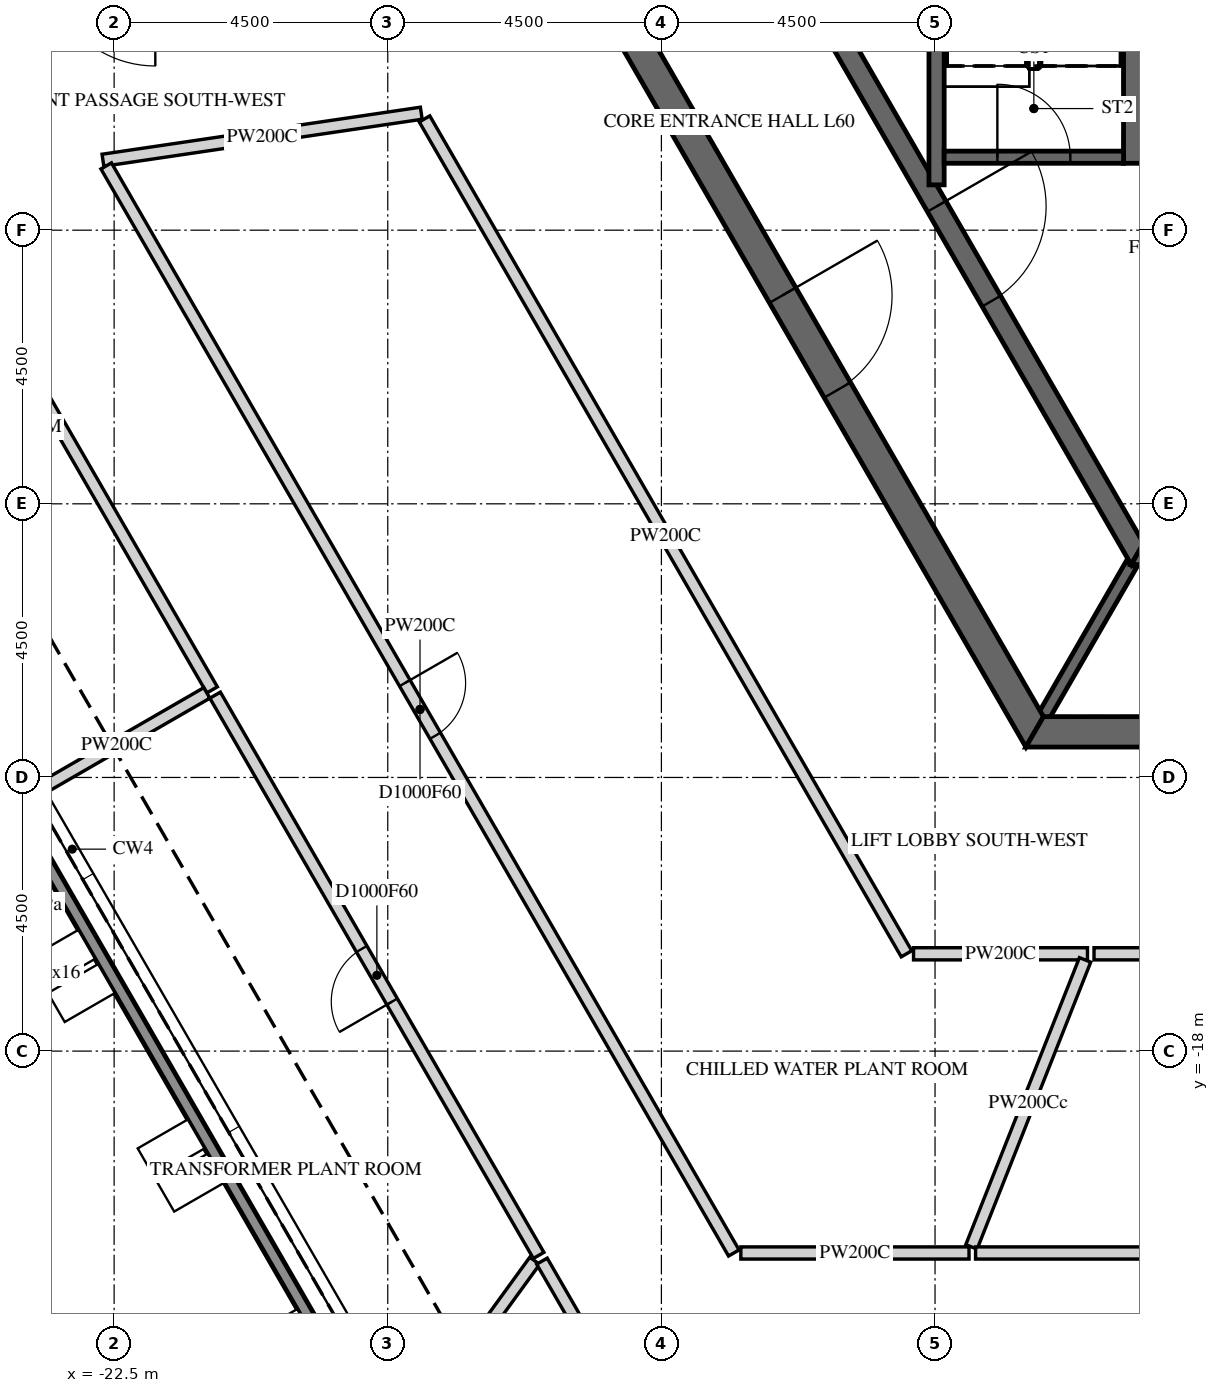
"""IFC4 building model, lengths in metres.
Left out: names, types, materials, properties, quantities, classifications, styles, units other than length and angle.
Written with IfcOpenShell. Run it as: python <this file> out.ifc"""

import sys

from ifc_helpers import new_model, si_unit, direction, frame, frame_2d, origin, place, context, subcontext, project, spatial, polyline, rectangle, outline, extrude, element, fill, save


model = new_model("IFC4")
c1 = context("Model", 3, precision=1e-05, world=origin(), true_north=direction((0.0, 1.0)))
c2 = subcontext(c1, "Body", "Model", "MODEL_VIEW")
j1 = project(units=[si_unit("LENGTHUNIT", "METRE"), si_unit("PLANEANGLEUNIT", "RADIAN")], contexts=[c1])
p1 = place(None, origin())
s1 = spatial("IfcSite", under=j1, at=p1, CompositionType="ELEMENT")
p2 = place(p1, origin())
s2 = spatial("IfcBuilding", under=s1, at=p2, CompositionType="ELEMENT")
p3 = place(p2, frame((0.0, 0.0, 250.2)))
s3 = spatial("IfcBuildingStorey", under=s2, at=p3, CompositionType="ELEMENT", Elevation=250.2)
p4 = place(p3, frame((-16.668, -26.93, 5.7), z_axis=(0.0, 0.0, 1.0), x_axis=(-0.499997219864, 0.866027008891, 0.0)))
e1 = element("IfcWall", 1, at=p4, inside=s3, PredefinedType="PARAPET", context=c2, shape_type="SweptSolid", body=[
    extrude(outline(polyline([(0.009, -0.1), (27.732, -0.1), (27.749, 0.1), (-0.009, 0.1), (0.009, -0.1)])), origin(), (0.0, 0.0, 1.0), 1.1),
])
p5 = place(p3, frame((-14.722, 0.0, -0.3), z_axis=(0.0, 0.0, 1.0), x_axis=(0.50000571537, -0.866022103989, 0.0)))
e2 = element("IfcWall", 2, at=p5, inside=s3, PredefinedType="SHEAR", context=c2, shape_type="SweptSolid", body=[
    extrude(outline(polyline([(-0.144, -0.25), (14.867, -0.25), (14.578, 0.25), (0.144, 0.25), (-0.144, -0.25)])), origin(), (0.0, 0.0, 1.0), 5.8),
])
p6 = place(p5, frame((6.432, 0.0, 0.3)))
e3 = element("IfcOpeningElement", 3, at=p6, cuts=e2, PredefinedType="OPENING", context=c2, shape_type="SweptSolid", body=[
    extrude(rectangle(XDim=1.8, YDim=2.4, at=frame_2d((0.9, 1.2))), frame((0.0, 0.26, 0.0), z_axis=(0.0, -1.0, 0.0), x_axis=(1.0, 0.0, 0.0)), (0.0, 0.0, 1.0), 0.52),
])
p7 = place(p3, frame((-7.361, -12.75, -0.3), z_axis=(0.0, 0.0, 1.0), x_axis=(1.0, 0.0, 0.0)))
e4 = element("IfcWall", 4, at=p7, inside=s3, PredefinedType="SHEAR", context=c2, shape_type="SweptSolid", body=[
    extrude(outline(polyline([(-0.144, -0.25), (14.866, -0.25), (14.578, 0.25), (0.144, 0.25), (-0.144, -0.25)])), origin(), (0.0, 0.0, 1.0), 5.8),
])
p8 = place(p7, frame((6.761, 0.0, 0.3)))
e5 = element("IfcOpeningElement", 5, at=p8, cuts=e4, PredefinedType="OPENING", context=c2, shape_type="SweptSolid", body=[
    extrude(rectangle(XDim=1.2, YDim=2.4, at=frame_2d((0.6, 1.2))), frame((0.0, 0.26, 0.0), z_axis=(0.0, -1.0, 0.0), x_axis=(1.0, 0.0, 0.0)), (0.0, 0.0, 1.0), 0.52),
])
p9 = place(p3, frame((-11.345, 0.0, -0.3), z_axis=(0.0, 0.0, 1.0), x_axis=(0.499995046907, -0.866028263435, 0.0)))
e6 = element("IfcWall", 6, at=p9, inside=s3, PredefinedType="SHEAR", context=c2, shape_type="SweptSolid", body=[
    extrude(outline(polyline([(-0.101, -0.175), (11.446, -0.175), (11.244, 0.175), (0.101, 0.175), (-0.101, -0.175)])), origin(), (0.0, 0.0, 1.0), 5.8),
])
p10 = place(p9, frame((4.744, 0.0, 0.3)))
e7 = element("IfcOpeningElement", 7, at=p10, cuts=e6, PredefinedType="OPENING", context=c2, shape_type="SweptSolid", body=[
    extrude(rectangle(XDim=1.8, YDim=2.4, at=frame_2d((0.9, 1.2))), frame((0.0, 0.185, 0.0), z_axis=(0.0, -1.0, 0.0), x_axis=(1.0, 0.0, 0.0)), (0.0, 0.0, 1.0), 0.37),
])
p11 = place(p3, frame((-5.673, -9.825, -0.3), z_axis=(0.0, 0.0, 1.0), x_axis=(1.0, 0.0, 0.0)))
e8 = element("IfcWall", 8, at=p11, inside=s3, PredefinedType="SHEAR", context=c2, shape_type="SweptSolid", body=[
    extrude(outline(polyline([(-0.101, -0.175), (11.446, -0.175), (11.244, 0.175), (0.101, 0.175), (-0.101, -0.175)])), origin(), (0.0, 0.0, 1.0), 5.8),
])
p12 = place(p3, frame((-5.773, -10.0, -0.3), z_axis=(0.0, 0.0, 1.0), x_axis=(-0.499995765644, -0.866027848477, 0.0)))
e9 = element("IfcWall", 9, at=p12, inside=s3, PredefinedType="SHEAR", context=c2, shape_type="SweptSolid", body=[
    extrude(rectangle(XDim=2.887, YDim=0.2, at=frame_2d((1.443, 0.0))), origin(), (0.0, 0.0, 1.0), 5.8),
])
p13 = place(p3, frame((-5.75, -3.4, -0.25), z_axis=(0.0, 0.0, 1.0), x_axis=(0.0, 1.0, 0.0)))
e10 = element("IfcWall", 10, at=p13, inside=s3, PredefinedType="SHEAR", context=c2, shape_type="SweptSolid", body=[
    extrude(rectangle(XDim=6.8, YDim=0.3, at=frame_2d((3.4, 0.0))), origin(), (0.0, 0.0, 1.0), 5.75),
])
p14 = place(p3, frame((-8.975, -3.755, -0.25), z_axis=(0.0, 0.0, 1.0), x_axis=(0.0, 1.0, 0.0)))
e11 = element("IfcWall", 11, at=p14, inside=s3, PredefinedType="SHEAR", context=c2, shape_type="SweptSolid", body=[
    extrude(rectangle(XDim=7.51, YDim=0.25, at=frame_2d((3.755, 0.0))), origin(), (0.0, 0.0, 1.0), 5.75),
])
p15 = place(p3, frame((-8.85, -3.3, -0.25), z_axis=(0.0, 0.0, 1.0), x_axis=(1.0, 0.0, 0.0)))
e12 = element("IfcWall", 12, at=p15, inside=s3, PredefinedType="SHEAR", context=c2, shape_type="SweptSolid", body=[
    extrude(rectangle(XDim=2.95, YDim=0.2, at=frame_2d((1.475, 0.0))), origin(), (0.0, 0.0, 1.0), 5.75),
])
p16 = place(p15, frame((0.875, 0.0, 0.25)))
e13 = element("IfcOpeningElement", 13, at=p16, cuts=e12, PredefinedType="OPENING", context=c2, shape_type="SweptSolid", body=[
    extrude(rectangle(XDim=1.2, YDim=2.4, at=frame_2d((0.6, 1.2))), frame((0.0, 0.11, 0.0), z_axis=(0.0, -1.0, 0.0), x_axis=(1.0, 0.0, 0.0)), (0.0, 0.0, 1.0), 0.22),
])
p17 = place(p3, frame((-20.889, -12.06, 0.0), z_axis=(0.0, 0.0, 1.0), x_axis=(-0.49997661062, 0.866038907228, 0.0)))
e14 = element("IfcWall", 14, at=p17, inside=s3, PredefinedType="PARTITIONING", context=c2, shape_type="SweptSolid", body=[
    extrude(rectangle(XDim=13.637, YDim=0.2, at=frame_2d((6.818, 0.0))), origin(), (0.0, 0.0, 1.0), 5.5),
])
p18 = place(p17, frame((6.318, 0.0, 0.0)))
e15 = element("IfcOpeningElement", 15, at=p18, cuts=e14, PredefinedType="OPENING", context=c2, shape_type="SweptSolid", body=[
    extrude(rectangle(XDim=1.0, YDim=2.1, at=frame_2d((0.5, 1.05))), frame((0.0, 0.11, 0.0), z_axis=(0.0, -1.0, 0.0), x_axis=(1.0, 0.0, 0.0)), (0.0, 0.0, 1.0), 0.22),
])
p19 = place(p3, frame((-23.945, -13.825, 0.0), z_axis=(0.0, 0.0, 1.0), x_axis=(0.865991142412, 0.500059337743, 0.0)))
e16 = element("IfcWall", 16, at=p19, inside=s3, PredefinedType="PARTITIONING", context=c2, shape_type="SweptSolid", body=[
    extrude(rectangle(XDim=3.429, YDim=0.2, at=frame_2d((1.715, 0.0))), origin(), (0.0, 0.0, 1.0), 5.5),
])
p20 = place(p3, frame((-22.684, -3.35, 0.0), z_axis=(0.0, 0.0, 1.0), x_axis=(0.989268510668, 0.146108910753, 0.0)))
e17 = element("IfcWall", 17, at=p20, inside=s3, PredefinedType="PARTITIONING", context=c2, shape_type="SweptSolid", body=[
    extrude(rectangle(XDim=5.292, YDim=0.2, at=frame_2d((2.646, 0.0))), origin(), (0.0, 0.0, 1.0), 5.5),
])
p21 = place(p3, frame((-15.519, -21.36, 0.0), z_axis=(0.0, 0.0, 1.0), x_axis=(-0.500040928938, 0.866001772162, 0.0)))
e18 = element("IfcWall", 18, at=p21, inside=s3, PredefinedType="PARTITIONING", context=c2, shape_type="SweptSolid", body=[
    extrude(rectangle(XDim=10.639, YDim=0.2, at=frame_2d((5.32, 0.0))), origin(), (0.0, 0.0, 1.0), 5.5),
])
p22 = place(p21, frame((4.82, 0.0, 0.0)))
e19 = element("IfcOpeningElement", 19, at=p22, cuts=e18, PredefinedType="OPENING", context=c2, shape_type="SweptSolid", body=[
    extrude(rectangle(XDim=1.0, YDim=2.1, at=frame_2d((0.5, 1.05))), frame((0.0, 0.11, 0.0), z_axis=(0.0, -1.0, 0.0), x_axis=(1.0, 0.0, 0.0)), (0.0, 0.0, 1.0), 0.22),
])
p23 = place(p3, frame((-17.78, -24.471, 0.0), z_axis=(0.0, 0.0, 1.0), x_axis=(0.587876353265, 0.808950797807, 0.0)))
e20 = element("IfcWall", 20, at=p23, inside=s3, PredefinedType="PARTITIONING", context=c2, shape_type="SweptSolid", body=[
    extrude(rectangle(XDim=3.736, YDim=0.2, at=frame_2d((1.868, 0.0))), origin(), (0.0, 0.0, 1.0), 5.5),
])
p24 = place(p3, frame((-17.395, -2.67, 0.0), z_axis=(0.0, 0.0, 1.0), x_axis=(0.499971736126, -0.866041721325, 0.0)))
e21 = element("IfcWall", 21, at=p24, inside=s3, PredefinedType="PARTITIONING", context=c2, shape_type="SweptSolid", body=[
    extrude(rectangle(XDim=15.854, YDim=0.2, at=frame_2d((7.927, 0.0))), origin(), (0.0, 0.0, 1.0), 5.5),
])
p25 = place(p3, frame((-15.464, -21.455, 0.0), z_axis=(0.0, 0.0, 1.0), x_axis=(0.49988498741, -0.866091796152, 0.0)))
e22 = element("IfcWall", 22, at=p25, inside=s3, PredefinedType="PARTITIONING", context=c2, shape_type="SweptSolid", body=[
    extrude(rectangle(XDim=3.077, YDim=0.2, at=frame_2d((1.539, 0.0))), origin(), (0.0, 0.0, 1.0), 5.5),
])
p26 = place(p3, frame((-22.63, -3.443, 0.0), z_axis=(0.0, 0.0, 1.0), x_axis=(0.49999205116, -0.866029993001, 0.0)))
e23 = element("IfcWall", 23, at=p26, inside=s3, PredefinedType="PARTITIONING", context=c2, shape_type="SweptSolid", body=[
    extrude(rectangle(XDim=20.642, YDim=0.2, at=frame_2d((10.321, 0.0))), origin(), (0.0, 0.0, 1.0), 5.5),
])
p27 = place(p26, frame((9.821, 0.0, 0.0)))
e24 = element("IfcOpeningElement", 24, at=p27, cuts=e23, PredefinedType="OPENING", context=c2, shape_type="SweptSolid", body=[
    extrude(rectangle(XDim=1.0, YDim=2.1, at=frame_2d((0.5, 1.05))), frame((0.0, 0.11, 0.0), z_axis=(0.0, -1.0, 0.0), x_axis=(1.0, 0.0, 0.0)), (0.0, 0.0, 1.0), 0.22),
])
p28 = place(p3, frame((-9.354, -16.4, 0.0), z_axis=(0.0, 0.0, 1.0), x_axis=(1.0, 0.0, 0.0)))
e25 = element("IfcWall", 25, at=p28, inside=s3, PredefinedType="PARTITIONING", context=c2, shape_type="SweptSolid", body=[
    extrude(rectangle(XDim=2.861, YDim=0.2, at=frame_2d((1.43, 0.0))), origin(), (0.0, 0.0, 1.0), 5.5),
])
p29 = place(p3, frame((-8.441, -21.32, 0.0), z_axis=(0.0, 0.0, 1.0), x_axis=(-1.0, 0.0, 0.0)))
e26 = element("IfcWall", 26, at=p29, inside=s3, PredefinedType="PARTITIONING", context=c2, shape_type="SweptSolid", body=[
    extrude(rectangle(XDim=3.753, YDim=0.2, at=frame_2d((1.876, 0.0))), origin(), (0.0, 0.0, 1.0), 5.5),
])
p30 = place(p3, frame((-8.401, -21.22, 0.0), z_axis=(0.0, 0.0, 1.0), x_axis=(0.368104754475, 0.92978432431, 0.0)))
e27 = element("IfcWall", 27, at=p30, inside=s3, PredefinedType="PARTITIONING", context=c2, shape_type="SweptSolid", body=[
    extrude(rectangle(XDim=5.076, YDim=0.2, at=frame_2d((2.538, 0.0))), origin(), (0.0, 0.0, 1.0), 4.573),
])
p31 = place(p3, frame((-6.385, -16.4, 0.0), z_axis=(0.0, 0.0, 1.0), x_axis=(1.0, 0.0, 0.0)))
e28 = element("IfcWall", 28, at=p31, inside=s3, PredefinedType="PARTITIONING", context=c2, shape_type="SweptSolid", body=[
    extrude(rectangle(XDim=15.565, YDim=0.2, at=frame_2d((7.783, 0.0))), origin(), (0.0, 0.0, 1.0), 5.5),
])
p32 = place(p3, frame((-8.333, -21.32, 0.0), z_axis=(0.0, 0.0, 1.0), x_axis=(1.0, 0.0, 0.0)))
e29 = element("IfcWall", 29, at=p32, inside=s3, PredefinedType="PARTITIONING", context=c2, shape_type="SweptSolid", body=[
    extrude(rectangle(XDim=20.354, YDim=0.2, at=frame_2d((10.177, 0.0))), origin(), (0.0, 0.0, 1.0), 5.5),
])
p33 = place(p32, frame((9.677, 0.0, 0.0)))
e30 = element("IfcOpeningElement", 30, at=p33, cuts=e29, PredefinedType="OPENING", context=c2, shape_type="SweptSolid", body=[
    extrude(rectangle(XDim=1.0, YDim=2.1, at=frame_2d((0.5, 1.05))), frame((0.0, 0.11, 0.0), z_axis=(0.0, -1.0, 0.0), x_axis=(1.0, 0.0, 0.0)), (0.0, 0.0, 1.0), 0.22),
])
p34 = place(p6, origin())
e31 = element("IfcDoor", 31, at=p34, inside=s3, OperationType="DOUBLE_DOOR_SINGLE_SWING", PredefinedType="DOOR", context=c2, shape_type="SweptSolid", body=[
    extrude(rectangle(XDim=1.8, YDim=2.4, at=frame_2d((0.9, 1.2))), frame((0.0, 0.025, 0.0), z_axis=(0.0, -1.0, 0.0), x_axis=(1.0, 0.0, 0.0)), (0.0, 0.0, 1.0), 0.05),
])
fill(e3, e31)
p35 = place(p10, origin())
e32 = element("IfcDoor", 32, at=p35, inside=s3, OperationType="DOUBLE_DOOR_SINGLE_SWING", PredefinedType="DOOR", context=c2, shape_type="SweptSolid", body=[
    extrude(rectangle(XDim=1.8, YDim=2.4, at=frame_2d((0.9, 1.2))), frame((0.0, 0.025, 0.0), z_axis=(0.0, -1.0, 0.0), x_axis=(1.0, 0.0, 0.0)), (0.0, 0.0, 1.0), 0.05),
])
fill(e7, e32)
p36 = place(p16, origin())
e33 = element("IfcDoor", 33, at=p36, inside=s3, OperationType="SINGLE_SWING_LEFT", PredefinedType="DOOR", context=c2, shape_type="SweptSolid", body=[
    extrude(rectangle(XDim=1.2, YDim=2.4, at=frame_2d((0.6, 1.2))), frame((0.0, 0.025, 0.0), z_axis=(0.0, -1.0, 0.0), x_axis=(1.0, 0.0, 0.0)), (0.0, 0.0, 1.0), 0.05),
])
fill(e13, e33)
p37 = place(p22, origin())
e34 = element("IfcDoor", 34, at=p37, inside=s3, OperationType="SINGLE_SWING_LEFT", PredefinedType="DOOR", context=c2, shape_type="SweptSolid", body=[
    extrude(rectangle(XDim=1.0, YDim=2.1, at=frame_2d((0.5, 1.05))), frame((0.0, 0.025, 0.0), z_axis=(0.0, -1.0, 0.0), x_axis=(1.0, 0.0, 0.0)), (0.0, 0.0, 1.0), 0.05),
])
fill(e19, e34)
p38 = place(p27, origin())
e35 = element("IfcDoor", 35, at=p38, inside=s3, OperationType="SINGLE_SWING_LEFT", PredefinedType="DOOR", context=c2, shape_type="SweptSolid", body=[
    extrude(rectangle(XDim=1.0, YDim=2.1, at=frame_2d((0.5, 1.05))), frame((0.0, 0.025, 0.0), z_axis=(0.0, -1.0, 0.0), x_axis=(1.0, 0.0, 0.0)), (0.0, 0.0, 1.0), 0.05),
])
fill(e24, e35)
save(model, sys.argv[1])
